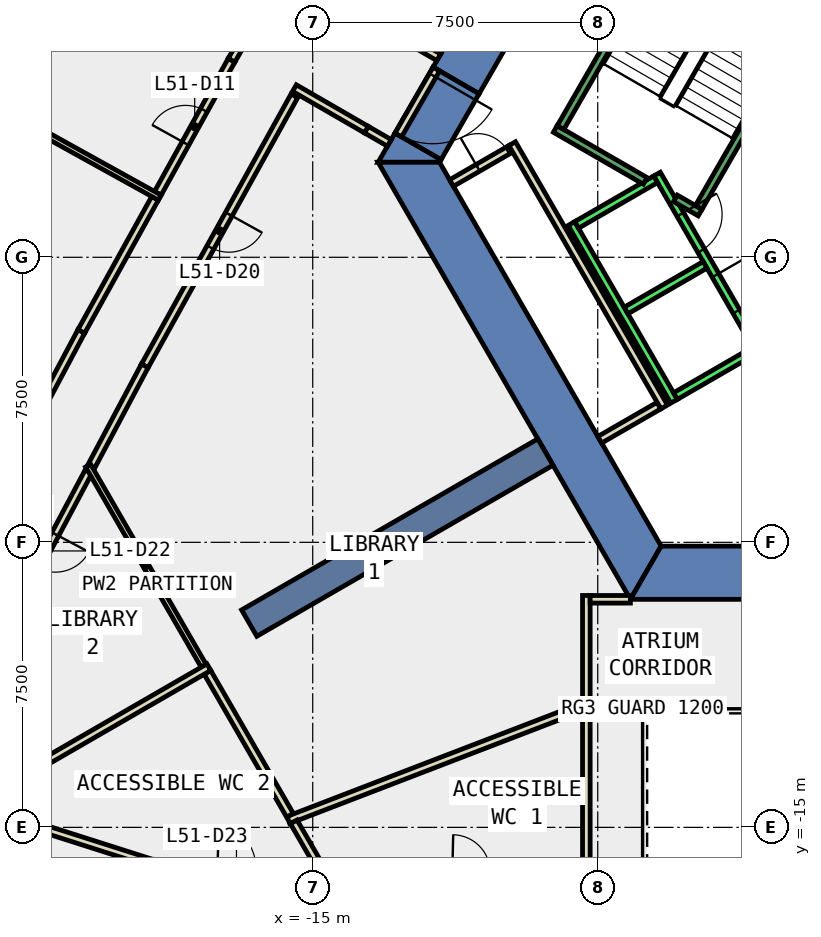
"""IFC4 building model, lengths in metres.
Left out: names, types, materials, properties, quantities, classifications, styles, units other than length and angle.
Written with IfcOpenShell. Run it as: python <this file> out.ifc"""

import sys

from ifc_helpers import new_model, si_unit, direction, frame, frame_2d, origin, place, context, subcontext, project, spatial, polyline, rectangle, outline, extrude, element, fill, save


model = new_model("IFC4")
c1 = context("Model", 3, precision=1e-05, world=origin(), true_north=direction((0.0, 1.0)))
c2 = subcontext(c1, "Body", "Model", "MODEL_VIEW")
j1 = project(units=[si_unit("LENGTHUNIT", "METRE"), si_unit("PLANEANGLEUNIT", "RADIAN")], contexts=[c1])
p1 = place(None, origin())
s1 = spatial("IfcSite", under=j1, at=p1, CompositionType="ELEMENT")
p2 = place(p1, origin())
s2 = spatial("IfcBuilding", under=s1, at=p2, CompositionType="ELEMENT")
p3 = place(p2, frame((0.0, 0.0, 227.6)))
s3 = spatial("IfcBuildingStorey", under=s2, at=p3, CompositionType="ELEMENT", Elevation=227.6)
p4 = place(p3, frame((0.0, 0.0, -0.4)))
e1 = element("IfcWall", 1, at=p4, inside=s3, PredefinedType="SHEAR", context=c2, shape_type="SweptSolid", body=[
    extrude(outline(polyline([(-11.834, 5.002), (-10.622, 4.302), (-5.831, 12.6), (-6.64, 14.0), (-11.834, 5.002)])), origin(), (0.0, 0.0, 1.0), 4.2),
])
p5 = place(p3, frame((0.0, 0.0, -0.4)))
e2 = element("IfcWall", 2, at=p5, inside=s3, PredefinedType="SHEAR", context=c2, shape_type="SweptSolid", body=[
    extrude(outline(polyline([(-11.622, 2.57), (-12.834, 3.27), (-13.279, 2.5), (-11.662, 2.5), (-11.622, 2.57)])), origin(), (0.0, 0.0, 1.0), 4.2),
])
p6 = place(p3, frame((0.0, 0.0, 3.6)))
e3 = element("IfcWall", 3, at=p6, inside=s3, PredefinedType="SHEAR", context=c2, shape_type="SweptSolid", body=[
    extrude(outline(polyline([(-12.834, 3.27), (-11.622, 2.57), (-10.622, 4.302), (-11.834, 5.002), (-12.834, 3.27)])), origin(), (0.0, 0.0, 1.0), 0.2),
])
p7 = place(p3, frame((0.0, 0.0, -0.4)))
e4 = element("IfcWall", 4, at=p7, inside=s3, PredefinedType="SHEAR", context=c2, shape_type="SweptSolid", body=[
    extrude(outline(polyline([(-13.279, 2.5), (-6.64, -9.0), (-5.831, -7.6), (-11.662, 2.5), (-13.279, 2.5)])), origin(), (0.0, 0.0, 1.0), 4.2),
])
p8 = place(p3, frame((0.0, 0.0, -0.4)))
e5 = element("IfcWall", 5, at=p8, inside=s3, PredefinedType="SHEAR", context=c2, shape_type="SweptSolid", body=[
    extrude(outline(polyline([(3.75, -9.0), (3.75, -7.6), (-5.831, -7.6), (-6.64, -9.0), (3.75, -9.0)])), origin(), (0.0, 0.0, 1.0), 4.2),
])
p9 = place(p3, frame((-8.877, -5.125, -0.4), z_axis=(0.0, 0.0, 1.0), x_axis=(-0.866017533419, -0.500013631625, 0.0)))
e6 = element("IfcWall", 6, at=p9, inside=s3, PredefinedType="SHEAR", context=c2, shape_type="SweptSolid", body=[
    extrude(rectangle(XDim=9.0, YDim=0.8, at=frame_2d((4.5, 0.0))), origin(), (0.0, 0.0, 1.0), 4.2),
])
p10 = place(p3, frame((-15.482, 4.249, 0.0), z_axis=(0.0, 0.0, 1.0), x_axis=(-0.484683114876, -0.874689818252, 0.0)))
e7 = element("IfcWall", 7, at=p10, inside=s3, PredefinedType="PARTITIONING", context=c2, shape_type="SweptSolid", body=[
    extrude(rectangle(XDim=8.123, YDim=0.2, at=frame_2d((4.062, 0.0))), origin(), (0.0, 0.0, 1.0), 3.8),
])
p11 = place(p10, frame((3.561, 0.0, 0.0)))
e8 = element("IfcOpeningElement", 8, at=p11, cuts=e7, PredefinedType="OPENING", context=c2, shape_type="SweptSolid", body=[
    extrude(rectangle(XDim=1.0, YDim=2.1, at=frame_2d((0.5, 1.05))), frame((0.0, 0.11, 0.0), z_axis=(0.0, -1.0, 0.0), x_axis=(1.0, 0.0, 0.0)), (0.0, 0.0, 1.0), 0.22),
])
p12 = place(p3, frame((-19.419, -2.856, 0.0), z_axis=(0.0, 0.0, 1.0), x_axis=(-0.469627838973, -0.882864481595, 0.0)))
e9 = element("IfcWall", 9, at=p12, inside=s3, PredefinedType="PARTITIONING", context=c2, shape_type="SweptSolid", body=[
    extrude(rectangle(XDim=2.996, YDim=0.2, at=frame_2d((1.498, 0.0))), origin(), (0.0, 0.0, 1.0), 3.8),
])
p13 = place(p3, frame((-12.984, 3.01, 0.0), z_axis=(0.0, 0.0, 1.0), x_axis=(-0.865959057869, 0.500114896893, 0.0)))
e10 = element("IfcWall", 10, at=p13, inside=s3, PredefinedType="PARTITIONING", context=c2, shape_type="SweptSolid", body=[
    extrude(rectangle(XDim=0.7, YDim=0.2, at=frame_2d((0.35, 0.0))), origin(), (0.0, 0.0, 1.0), 2.4),
])
p14 = place(p3, frame((-20.896, -5.634, 0.0), z_axis=(0.0, 0.0, 1.0), x_axis=(-0.469448951755, -0.882959614986, 0.0)))
e11 = element("IfcWall", 11, at=p14, inside=s3, PredefinedType="PARTITIONING", context=c2, shape_type="SweptSolid", body=[
    extrude(rectangle(XDim=4.74, YDim=0.2, at=frame_2d((2.37, 0.0))), origin(), (0.0, 0.0, 1.0), 3.8),
])
p15 = place(p14, frame((1.87, 0.0, 0.0)))
e12 = element("IfcOpeningElement", 12, at=p15, cuts=e11, PredefinedType="OPENING", context=c2, shape_type="SweptSolid", body=[
    extrude(rectangle(XDim=1.0, YDim=2.1, at=frame_2d((0.5, 1.05))), frame((0.0, 0.11, 0.0), z_axis=(0.0, -1.0, 0.0), x_axis=(1.0, 0.0, 0.0)), (0.0, 0.0, 1.0), 0.22),
])
p16 = place(p3, frame((-22.435, -14.92, 0.0), z_axis=(0.0, 0.0, 1.0), x_axis=(0.952831275662, -0.303500510906, 0.0)))
e13 = element("IfcWall", 13, at=p16, inside=s3, PredefinedType="PARTITIONING", context=c2, shape_type="SweptSolid", body=[
    extrude(rectangle(XDim=3.259, YDim=0.2, at=frame_2d((1.629, 0.0))), origin(), (0.0, 0.0, 1.0), 3.8),
])
p17 = place(p3, frame((-19.076, 1.684, 0.0), z_axis=(0.0, 0.0, 1.0), x_axis=(0.484679349661, 0.874691904623, 0.0)))
e14 = element("IfcWall", 14, at=p17, inside=s3, PredefinedType="PARTITIONING", context=c2, shape_type="SweptSolid", body=[
    extrude(rectangle(XDim=4.002, YDim=0.2, at=frame_2d((2.001, 0.0))), origin(), (0.0, 0.0, 1.0), 3.8),
])
p18 = place(p17, frame((1.501, 0.0, 0.0)))
e15 = element("IfcOpeningElement", 15, at=p18, cuts=e14, PredefinedType="OPENING", context=c2, shape_type="SweptSolid", body=[
    extrude(rectangle(XDim=1.0, YDim=2.1, at=frame_2d((0.5, 1.05))), frame((0.0, 0.11, 0.0), z_axis=(0.0, -1.0, 0.0), x_axis=(1.0, 0.0, 0.0)), (0.0, 0.0, 1.0), 0.22),
])
p19 = place(p3, frame((-17.136, 5.185, 0.0), z_axis=(0.0, 0.0, 1.0), x_axis=(0.500102734445, 0.865966081899, 0.0)))
e16 = element("IfcWall", 16, at=p19, inside=s3, PredefinedType="PARTITIONING", context=c2, shape_type="SweptSolid", body=[
    extrude(rectangle(XDim=4.001, YDim=0.2, at=frame_2d((2.0, 0.0))), origin(), (0.0, 0.0, 1.0), 3.8),
])
p20 = place(p3, frame((-24.866, -9.053, 0.0), z_axis=(0.0, 0.0, 1.0), x_axis=(0.469431794586, 0.882968736837, 0.0)))
e17 = element("IfcWall", 17, at=p20, inside=s3, PredefinedType="PARTITIONING", context=c2, shape_type="SweptSolid", body=[
    extrude(rectangle(XDim=8.046, YDim=0.2, at=frame_2d((4.023, 0.0))), origin(), (0.0, 0.0, 1.0), 3.8),
])
p21 = place(p20, frame((3.522, 0.0, 0.0)))
e18 = element("IfcOpeningElement", 18, at=p21, cuts=e17, PredefinedType="OPENING", context=c2, shape_type="SweptSolid", body=[
    extrude(rectangle(XDim=1.0, YDim=2.1, at=frame_2d((0.5, 1.05))), frame((0.0, 0.11, 0.0), z_axis=(0.0, -1.0, 0.0), x_axis=(1.0, 0.0, 0.0)), (0.0, 0.0, 1.0), 0.22),
])
p22 = place(p3, frame((-21.089, -1.949, 0.0), z_axis=(0.0, 0.0, 1.0), x_axis=(0.484622593188, 0.874723351793, 0.0)))
e19 = element("IfcWall", 19, at=p22, inside=s3, PredefinedType="PARTITIONING", context=c2, shape_type="SweptSolid", body=[
    extrude(rectangle(XDim=4.003, YDim=0.2, at=frame_2d((2.002, 0.0))), origin(), (0.0, 0.0, 1.0), 3.8),
])
p23 = place(p3, frame((-5.888, -3.902, 0.0), z_axis=(0.0, 0.0, 1.0), x_axis=(-0.866316547501, -0.499495384889, 0.0)))
e20 = element("IfcWall", 20, at=p23, inside=s3, PredefinedType="PARTITIONING", context=c2, shape_type="SweptSolid", body=[
    extrude(rectangle(XDim=1.8, YDim=0.2, at=frame_2d((0.9, 0.0))), origin(), (0.0, 0.0, 1.0), 3.8),
])
p24 = place(p3, frame((-11.347, 1.954, 0.0), z_axis=(0.0, 0.0, 1.0), x_axis=(0.866282695276, 0.499554093032, 0.0)))
e21 = element("IfcWall", 21, at=p24, inside=s3, PredefinedType="PARTITIONING", context=c2, shape_type="SweptSolid", body=[
    extrude(rectangle(XDim=1.8, YDim=0.2, at=frame_2d((0.9, 0.0))), origin(), (0.0, 0.0, 1.0), 3.8),
])
p25 = place(p24, frame((0.8, 0.0, 0.0)))
e22 = element("IfcOpeningElement", 22, at=p25, cuts=e21, PredefinedType="OPENING", context=c2, shape_type="SweptSolid", body=[
    extrude(rectangle(XDim=0.9, YDim=2.1, at=frame_2d((0.45, 1.05))), frame((0.0, 0.11, 0.0), z_axis=(0.0, -1.0, 0.0), x_axis=(1.0, 0.0, 0.0)), (0.0, 0.0, 1.0), 0.22),
])
p26 = place(p3, frame((-9.751, 2.99, 0.0), z_axis=(0.0, 0.0, 1.0), x_axis=(0.500012163284, -0.866018381195, 0.0)))
e23 = element("IfcWall", 23, at=p26, inside=s3, PredefinedType="PARTITIONING", context=c2, shape_type="SweptSolid", body=[
    extrude(rectangle(XDim=8.0, YDim=0.2, at=frame_2d((4.0, 0.0))), origin(), (0.0, 0.0, 1.0), 3.8),
])
p27 = place(p3, frame((-7.8, -11.69, 0.0), z_axis=(0.0, 0.0, 1.0), x_axis=(0.0, 1.0, 0.0)))
e24 = element("IfcWall", 24, at=p27, inside=s3, PredefinedType="PARTITIONING", context=c2, shape_type="SweptSolid", body=[
    extrude(rectangle(XDim=2.791, YDim=0.2, at=frame_2d((1.396, 0.0))), origin(), (0.0, 0.0, 1.0), 3.8),
])
p28 = place(p3, frame((-7.7, -8.999, 0.0), z_axis=(0.0, 0.0, 1.0), x_axis=(1.0, 0.0, 0.0)))
e25 = element("IfcWall", 25, at=p28, inside=s3, PredefinedType="PARTITIONING", context=c2, shape_type="SweptSolid", body=[
    extrude(rectangle(XDim=1.059, YDim=0.2, at=frame_2d((0.529, 0.0))), origin(), (0.0, 0.0, 1.0), 3.8),
])
p29 = place(p3, frame((-7.8, -16.176, 0.0), z_axis=(0.0, 0.0, 1.0), x_axis=(0.0, 1.0, 0.0)))
e26 = element("IfcWall", 26, at=p29, inside=s3, PredefinedType="PARTITIONING", context=c2, shape_type="SweptSolid", body=[
    extrude(rectangle(XDim=4.286, YDim=0.2, at=frame_2d((2.143, 0.0))), origin(), (0.0, 0.0, 1.0), 3.8),
])
p30 = place(p3, frame((-7.707, -11.755, 0.0), z_axis=(0.0, 0.0, 1.0), x_axis=(-0.933420343818, -0.358784701105, 0.0)))
e27 = element("IfcWall", 27, at=p30, inside=s3, PredefinedType="PARTITIONING", context=c2, shape_type="SweptSolid", body=[
    extrude(rectangle(XDim=8.501, YDim=0.2, at=frame_2d((4.25, 0.0))), origin(), (0.0, 0.0, 1.0), 3.8),
])
p31 = place(p3, frame((-17.87, -10.749, 0.0), z_axis=(0.0, 0.0, 1.0), x_axis=(-0.499907758807, 0.866078652713, 0.0)))
e28 = element("IfcWall", 28, at=p31, inside=s3, PredefinedType="PARTITIONING", context=c2, shape_type="SweptSolid", body=[
    extrude(rectangle(XDim=6.083, YDim=0.15, at=frame_2d((3.042, 0.0))), origin(), (0.0, 0.0, 1.0), 3.8),
])
p32 = place(p3, frame((-15.599, -14.682, 0.0), z_axis=(0.0, 0.0, 1.0), x_axis=(-0.500033987016, 0.866005780482, 0.0)))
e29 = element("IfcWall", 29, at=p32, inside=s3, PredefinedType="PARTITIONING", context=c2, shape_type="SweptSolid", body=[
    extrude(rectangle(XDim=4.342, YDim=0.2, at=frame_2d((2.171, 0.0))), origin(), (0.0, 0.0, 1.0), 3.8),
])
p33 = place(p3, frame((-14.778, -16.103, 0.0), z_axis=(0.0, 0.0, 1.0), x_axis=(-0.500495009846, 0.865739421027, 0.0)))
e30 = element("IfcWall", 30, at=p33, inside=s3, PredefinedType="PARTITIONING", context=c2, shape_type="SweptSolid", body=[
    extrude(rectangle(XDim=1.44, YDim=0.2, at=frame_2d((0.72, 0.0))), origin(), (0.0, 0.0, 1.0), 3.8),
])
p34 = place(p3, frame((-17.733, -10.785, 0.0), z_axis=(0.0, 0.0, 1.0), x_axis=(-0.865978611197, -0.500081038382, 0.0)))
e31 = element("IfcWall", 31, at=p34, inside=s3, PredefinedType="PARTITIONING", context=c2, shape_type="SweptSolid", body=[
    extrude(rectangle(XDim=6.581, YDim=0.2, at=frame_2d((3.291, 0.0))), origin(), (0.0, 0.0, 1.0), 3.8),
])
p35 = place(p3, frame((-19.025, 1.57, 0.0), z_axis=(0.0, 0.0, 1.0), x_axis=(-0.874714019242, 0.484639437666, 0.0)))
e32 = element("IfcWall", 32, at=p35, inside=s3, PredefinedType="PARTITIONING", context=c2, shape_type="SweptSolid", body=[
    extrude(rectangle(XDim=5.6, YDim=0.15, at=frame_2d((2.8, 0.0))), origin(), (0.0, 0.0, 1.0), 3.8),
])
p36 = place(p3, frame((-11.747, 4.952, 0.0), z_axis=(0.0, 0.0, 1.0), x_axis=(-0.50002537861, -0.866010750942, 0.0)))
e33 = element("IfcWall", 33, at=p36, inside=s3, PredefinedType="PARTITIONING", context=c2, shape_type="SweptSolid", body=[
    extrude(rectangle(XDim=2.0, YDim=0.2, at=frame_2d((1.0, 0.0))), origin(), (0.0, 0.0, 1.0), 2.4),
])
p37 = place(p36, frame((0.19, 0.0, 0.0)))
e34 = element("IfcOpeningElement", 34, at=p37, cuts=e33, PredefinedType="OPENING", context=c2, shape_type="SweptSolid", body=[
    extrude(rectangle(XDim=1.8, YDim=2.1, at=frame_2d((0.9, 1.05))), frame((0.0, 0.11, 0.0), z_axis=(0.0, -1.0, 0.0), x_axis=(1.0, 0.0, 0.0)), (0.0, 0.0, 1.0), 0.22),
])
p38 = place(p3, frame((-12.29, 5.612, 0.0), z_axis=(0.0, 0.0, 1.0), x_axis=(0.865871789474, -0.500265973451, 0.0)))
e35 = element("IfcWall", 35, at=p38, inside=s3, PredefinedType="PARTITIONING", context=c2, shape_type="SweptSolid", body=[
    extrude(rectangle(XDim=0.7, YDim=0.2, at=frame_2d((0.35, 0.0))), origin(), (0.0, 0.0, 1.0), 2.4),
])
p39 = place(p3, frame((-13.59, 3.36, 0.0), z_axis=(0.0, 0.0, 1.0), x_axis=(-0.866004963011, 0.500035402787, 0.0)))
e36 = element("IfcWall", 36, at=p39, inside=s3, PredefinedType="PARTITIONING", context=c2, shape_type="SweptSolid", body=[
    extrude(rectangle(XDim=2.183, YDim=0.2, at=frame_2d((1.092, 0.0))), origin(), (0.0, 0.0, 1.0), 3.8),
])
p40 = place(p3, frame((-5.94, 2.188, 0.0), z_axis=(0.0, 0.0, 1.0), x_axis=(0.500034260056, -0.866005622828, 0.0)))
e37 = element("IfcWall", 37, at=p40, inside=s3, PredefinedType="STANDARD", context=c2, shape_type="SweptSolid", body=[
    extrude(rectangle(XDim=5.399, YDim=0.2, at=frame_2d((2.7, 0.0))), origin(), (0.0, 0.0, 1.0), 3.8),
])
p41 = place(p40, frame((3.075, 0.0, 0.0)))
e38 = element("IfcOpeningElement", 38, at=p41, cuts=e37, PredefinedType="OPENING", context=c2, shape_type="SweptSolid", body=[
    extrude(rectangle(XDim=1.1, YDim=2.1, at=frame_2d((0.55, 1.05))), frame((0.0, 0.11, 0.0), z_axis=(0.0, -1.0, 0.0), x_axis=(1.0, 0.0, 0.0)), (0.0, 0.0, 1.0), 0.22),
])
p42 = place(p40, frame((1.225, 0.0, 0.0)))
e39 = element("IfcOpeningElement", 39, at=p42, cuts=e37, PredefinedType="OPENING", context=c2, shape_type="SweptSolid", body=[
    extrude(rectangle(XDim=1.1, YDim=2.1, at=frame_2d((0.55, 1.05))), frame((0.0, 0.11, 0.0), z_axis=(0.0, -1.0, 0.0), x_axis=(1.0, 0.0, 0.0)), (0.0, 0.0, 1.0), 0.22),
])
p43 = place(p3, frame((-8.192, 0.888, 0.0), z_axis=(0.0, 0.0, 1.0), x_axis=(0.500034260056, -0.866005622828, 0.0)))
e40 = element("IfcWall", 40, at=p43, inside=s3, PredefinedType="STANDARD", context=c2, shape_type="SweptSolid", body=[
    extrude(rectangle(XDim=5.399, YDim=0.2, at=frame_2d((2.7, 0.0))), origin(), (0.0, 0.0, 1.0), 3.8),
])
for number, where, z_axis, x_axis in (
    (41, (-5.977, 2.052, 0.0), (0.0, 0.0, 1.0), (-0.866, -0.5, 0.0)),
    (42, (-4.677, -0.2, 0.0), (0.0, 0.0, 1.0), (-0.866, -0.5, 0.0)),
):
    element("IfcWall", number, at=place(p3, frame(where, z_axis=z_axis, x_axis=x_axis)), inside=s3, PredefinedType="STANDARD", context=c2, shape_type="SweptSolid", body=[
        extrude(rectangle(XDim=2.399, YDim=0.2, at=frame_2d((1.2, 0.0))), origin(), (0.0, 0.0, 1.0), 3.8),
    ])
p44 = place(p3, frame((-3.377, -2.452, 0.0), z_axis=(0.0, 0.0, 1.0), x_axis=(-0.865955154139, -0.50012165622, 0.0)))
e43 = element("IfcWall", 43, at=p44, inside=s3, PredefinedType="STANDARD", context=c2, shape_type="SweptSolid", body=[
    extrude(rectangle(XDim=2.4, YDim=0.2, at=frame_2d((1.2, 0.0))), origin(), (0.0, 0.0, 1.0), 3.8),
])
p45 = place(p3, frame((-6.25, 2.01, 0.0), z_axis=(0.0, 0.0, 1.0), x_axis=(-0.86611865017, 0.499838457731, 0.0)))
e44 = element("IfcWall", 44, at=p45, inside=s3, PredefinedType="STANDARD", context=c2, shape_type="SweptSolid", body=[
    extrude(rectangle(XDim=2.733, YDim=0.2, at=frame_2d((1.366, 0.0))), origin(), (0.0, 0.0, 1.0), 3.8),
])
p46 = place(p3, frame((-4.806, 1.176, 0.0), z_axis=(0.0, 0.0, 1.0), x_axis=(-0.866558586415, 0.499075361355, 0.0)))
e45 = element("IfcWall", 45, at=p46, inside=s3, PredefinedType="STANDARD", context=c2, shape_type="SweptSolid", body=[
    extrude(rectangle(XDim=0.751, YDim=0.2, at=frame_2d((0.376, 0.0))), origin(), (0.0, 0.0, 1.0), 3.8),
])
p47 = place(p3, frame((-1.393, 7.288, 0.0), z_axis=(0.0, 0.0, 1.0), x_axis=(-0.499963383562, -0.866046543262, 0.0)))
e46 = element("IfcWall", 46, at=p47, inside=s3, PredefinedType="STANDARD", context=c2, shape_type="SweptSolid", body=[
    extrude(rectangle(XDim=6.9, YDim=0.2, at=frame_2d((3.45, 0.0))), origin(), (0.0, 0.0, 1.0), 3.8),
])
p48 = place(p47, frame((0.45, 0.0, 0.0)))
e47 = element("IfcOpeningElement", 47, at=p48, cuts=e46, PredefinedType="OPENING", context=c2, shape_type="SweptSolid", body=[
    extrude(rectangle(XDim=1.1, YDim=2.2, at=frame_2d((0.55, 1.1))), frame((0.0, 0.11, 0.0), z_axis=(0.0, -1.0, 0.0), x_axis=(1.0, 0.0, 0.0)), (0.0, 0.0, 1.0), 0.22),
])
p49 = place(p3, frame((-5.03, 9.388, 0.0), z_axis=(0.0, 0.0, 1.0), x_axis=(-0.499978703459, -0.866037698999, 0.0)))
e48 = element("IfcWall", 48, at=p49, inside=s3, PredefinedType="STANDARD", context=c2, shape_type="SweptSolid", body=[
    extrude(rectangle(XDim=6.9, YDim=0.2, at=frame_2d((3.45, 0.0))), origin(), (0.0, 0.0, 1.0), 3.8),
])
p50 = place(p18, origin())
e49 = element("IfcDoor", 49, at=p50, inside=s3, OperationType="SINGLE_SWING_LEFT", PredefinedType="DOOR", context=c2, shape_type="SweptSolid", body=[
    extrude(rectangle(XDim=1.0, YDim=2.1, at=frame_2d((0.5, 1.05))), frame((0.0, 0.025, 0.0), z_axis=(0.0, -1.0, 0.0), x_axis=(1.0, 0.0, 0.0)), (0.0, 0.0, 1.0), 0.05),
])
fill(e15, e49)
p51 = place(p11, origin())
e50 = element("IfcDoor", 50, at=p51, inside=s3, OperationType="SINGLE_SWING_LEFT", PredefinedType="DOOR", context=c2, shape_type="SweptSolid", body=[
    extrude(rectangle(XDim=1.0, YDim=2.1, at=frame_2d((0.5, 1.05))), frame((0.0, 0.025, 0.0), z_axis=(0.0, -1.0, 0.0), x_axis=(1.0, 0.0, 0.0)), (0.0, 0.0, 1.0), 0.05),
])
fill(e8, e50)
p52 = place(p15, origin())
e51 = element("IfcDoor", 51, at=p52, inside=s3, OperationType="SINGLE_SWING_LEFT", PredefinedType="DOOR", context=c2, shape_type="SweptSolid", body=[
    extrude(rectangle(XDim=1.0, YDim=2.1, at=frame_2d((0.5, 1.05))), frame((0.0, 0.025, 0.0), z_axis=(0.0, -1.0, 0.0), x_axis=(1.0, 0.0, 0.0)), (0.0, 0.0, 1.0), 0.05),
])
fill(e12, e51)
p53 = place(p25, origin())
e52 = element("IfcDoor", 52, at=p53, inside=s3, OperationType="SINGLE_SWING_LEFT", PredefinedType="DOOR", context=c2, shape_type="SweptSolid", body=[
    extrude(rectangle(XDim=0.9, YDim=2.1, at=frame_2d((0.45, 1.05))), frame((0.0, 0.025, 0.0), z_axis=(0.0, -1.0, 0.0), x_axis=(1.0, 0.0, 0.0)), (0.0, 0.0, 1.0), 0.05),
])
fill(e22, e52)
p54 = place(p37, origin())
e53 = element("IfcDoor", 53, at=p54, inside=s3, OperationType="DOUBLE_DOOR_SINGLE_SWING", PredefinedType="DOOR", context=c2, shape_type="SweptSolid", body=[
    extrude(rectangle(XDim=1.8, YDim=2.1, at=frame_2d((0.9, 1.05))), frame((0.0, 0.025, 0.0), z_axis=(0.0, -1.0, 0.0), x_axis=(1.0, 0.0, 0.0)), (0.0, 0.0, 1.0), 0.05),
])
fill(e34, e53)
p55 = place(p41, origin())
e54 = element("IfcDoor", 54, at=p55, inside=s3, OperationType="SLIDING_TO_LEFT", PredefinedType="DOOR", context=c2, shape_type="SweptSolid", body=[
    extrude(rectangle(XDim=1.1, YDim=2.1, at=frame_2d((0.55, 1.05))), frame((0.0, 0.025, 0.0), z_axis=(0.0, -1.0, 0.0), x_axis=(1.0, 0.0, 0.0)), (0.0, 0.0, 1.0), 0.05),
])
fill(e38, e54)
p56 = place(p42, origin())
e55 = element("IfcDoor", 55, at=p56, inside=s3, OperationType="SLIDING_TO_LEFT", PredefinedType="DOOR", context=c2, shape_type="SweptSolid", body=[
    extrude(rectangle(XDim=1.1, YDim=2.1, at=frame_2d((0.55, 1.05))), frame((0.0, 0.025, 0.0), z_axis=(0.0, -1.0, 0.0), x_axis=(1.0, 0.0, 0.0)), (0.0, 0.0, 1.0), 0.05),
])
fill(e39, e55)
save(model, sys.argv[1])
